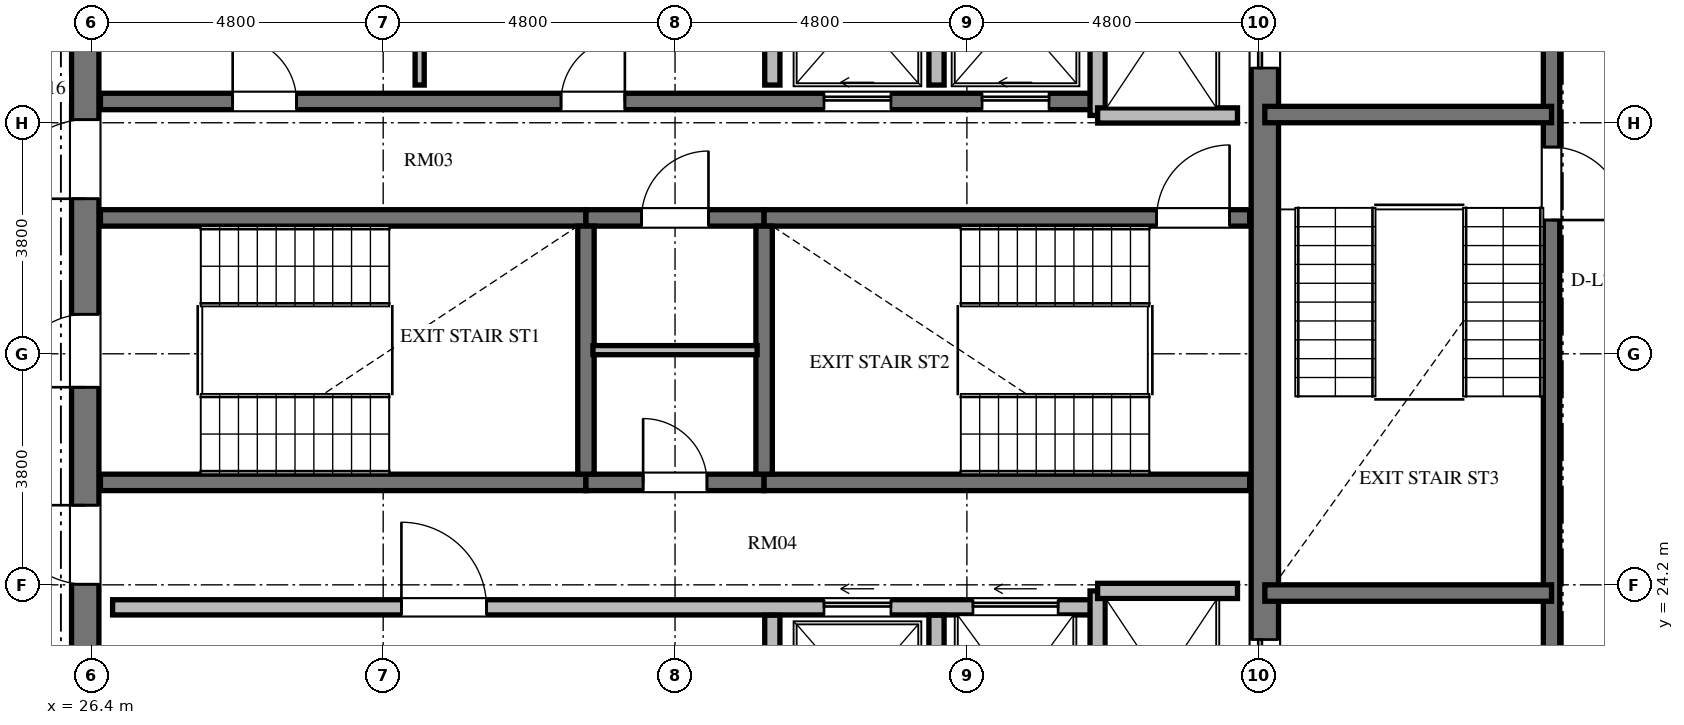
"""IFC4 building model, lengths in metres.
Left out: names, types, materials, properties, quantities, classifications, styles, units other than length and angle.
Written with IfcOpenShell. Run it as: python <this file> out.ifc"""

import sys

from ifc_helpers import new_model, si_unit, direction, frame, frame_2d, origin, place, context, subcontext, project, spatial, rectangle, extrude, element, fill, save


model = new_model("IFC4")
c1 = context("Model", 3, precision=1e-05, world=origin(), true_north=direction((0.0, 1.0)))
c2 = subcontext(c1, "Body", "Model", "MODEL_VIEW")
j1 = project(units=[si_unit("LENGTHUNIT", "METRE"), si_unit("PLANEANGLEUNIT", "RADIAN")], contexts=[c1])
p1 = place(None, origin())
s1 = spatial("IfcSite", under=j1, at=p1, CompositionType="ELEMENT")
p2 = place(p1, origin())
s2 = spatial("IfcBuilding", under=s1, at=p2, CompositionType="ELEMENT")
p3 = place(p2, frame((0.0, 0.0, 295.152)))
s3 = spatial("IfcBuildingStorey", under=s2, at=p3, CompositionType="ELEMENT", Elevation=295.152)
p4 = place(p3, frame((26.3, 20.95, 0.0), z_axis=(0.0, 0.0, 1.0), x_axis=(0.0, 1.0, 0.0)))
e1 = element("IfcWall", 1, at=p4, inside=s3, PredefinedType="SHEAR", context=c2, shape_type="SweptSolid", body=[
    extrude(rectangle(XDim=14.1, YDim=0.45, at=frame_2d((7.05, 0.0))), origin(), (0.0, 0.0, 1.0), 3.648),
])
p5 = place(p4, frame((6.5, 0.0, 0.0)))
e2 = element("IfcOpeningElement", 2, at=p5, cuts=e1, PredefinedType="OPENING", context=c2, shape_type="SweptSolid", body=[
    extrude(rectangle(XDim=1.2, YDim=2.15, at=frame_2d((0.6, 1.075))), frame((0.0, 0.235, 0.0), z_axis=(0.0, -1.0, 0.0), x_axis=(1.0, 0.0, 0.0)), (0.0, 0.0, 1.0), 0.47),
])
p6 = place(p4, frame((9.6, 0.0, 0.0)))
e3 = element("IfcOpeningElement", 3, at=p6, cuts=e1, PredefinedType="OPENING", context=c2, shape_type="SweptSolid", body=[
    extrude(rectangle(XDim=1.3, YDim=2.2, at=frame_2d((0.65, 1.1))), frame((0.0, 0.235, 0.0), z_axis=(0.0, -1.0, 0.0), x_axis=(1.0, 0.0, 0.0)), (0.0, 0.0, 1.0), 0.47),
])
p7 = place(p4, frame((3.26, 0.0, 0.0)))
e4 = element("IfcOpeningElement", 4, at=p7, cuts=e1, PredefinedType="OPENING", context=c2, shape_type="SweptSolid", body=[
    extrude(rectangle(XDim=1.3, YDim=2.2, at=frame_2d((0.65, 1.1))), frame((0.0, 0.235, 0.0), z_axis=(0.0, -1.0, 0.0), x_axis=(1.0, 0.0, 0.0)), (0.0, 0.0, 1.0), 0.47),
])
p8 = place(p3, frame((45.7, 20.95, 0.0), z_axis=(0.0, 0.0, 1.0), x_axis=(0.0, 1.0, 0.0)))
e5 = element("IfcWall", 5, at=p8, inside=s3, PredefinedType="SHEAR", context=c2, shape_type="SweptSolid", body=[
    extrude(rectangle(XDim=14.1, YDim=0.45, at=frame_2d((7.05, 0.0))), origin(), (0.0, 0.0, 1.0), 3.648),
])
p9 = place(p8, frame((11.75, 0.0, 0.0)))
e6 = element("IfcOpeningElement", 6, at=p9, cuts=e5, PredefinedType="OPENING", context=c2, shape_type="SweptSolid", body=[
    extrude(rectangle(XDim=1.4, YDim=2.3, at=frame_2d((0.7, 1.15))), frame((0.0, 0.235, 0.0), z_axis=(0.0, -1.0, 0.0), x_axis=(1.0, 0.0, 0.0)), (0.0, 0.0, 1.0), 0.47),
])
p10 = place(p8, frame((0.95, 0.0, 0.0)))
e7 = element("IfcOpeningElement", 7, at=p10, cuts=e5, PredefinedType="OPENING", context=c2, shape_type="SweptSolid", body=[
    extrude(rectangle(XDim=1.4, YDim=2.3, at=frame_2d((0.7, 1.15))), frame((0.0, 0.235, 0.0), z_axis=(0.0, -1.0, 0.0), x_axis=(1.0, 0.0, 0.0)), (0.0, 0.0, 1.0), 0.47),
])
p11 = place(p3, frame((26.55, 30.235, 0.0), z_axis=(0.0, 0.0, 1.0), x_axis=(1.0, 0.0, 0.0)))
e8 = element("IfcWall", 8, at=p11, inside=s3, PredefinedType="SHEAR", context=c2, shape_type="SweptSolid", body=[
    extrude(rectangle(XDim=7.985, YDim=0.27, at=frame_2d((3.992, 0.0))), origin(), (0.0, 0.0, 1.0), 3.648),
])
p12 = place(p3, frame((34.535, 30.235, 0.0), z_axis=(0.0, 0.0, 1.0), x_axis=(1.0, 0.0, 0.0)))
e9 = element("IfcWall", 9, at=p12, inside=s3, PredefinedType="SHEAR", context=c2, shape_type="SweptSolid", body=[
    extrude(rectangle(XDim=2.93, YDim=0.27, at=frame_2d((1.465, 0.0))), origin(), (0.0, 0.0, 1.0), 3.648),
])
p13 = place(p12, frame((0.915, 0.0, 0.0)))
e10 = element("IfcOpeningElement", 10, at=p13, cuts=e9, PredefinedType="OPENING", context=c2, shape_type="SweptSolid", body=[
    extrude(rectangle(XDim=1.1, YDim=2.15, at=frame_2d((0.55, 1.075))), frame((0.0, 0.145, 0.0), z_axis=(0.0, -1.0, 0.0), x_axis=(1.0, 0.0, 0.0)), (0.0, 0.0, 1.0), 0.29),
])
p14 = place(p3, frame((37.465, 30.235, 0.0), z_axis=(0.0, 0.0, 1.0), x_axis=(1.0, 0.0, 0.0)))
e11 = element("IfcWall", 11, at=p14, inside=s3, PredefinedType="SHEAR", context=c2, shape_type="SweptSolid", body=[
    extrude(rectangle(XDim=7.985, YDim=0.27, at=frame_2d((3.992, 0.0))), origin(), (0.0, 0.0, 1.0), 3.648),
])
p15 = place(p14, frame((6.455, 0.0, 0.0)))
e12 = element("IfcOpeningElement", 12, at=p15, cuts=e11, PredefinedType="OPENING", context=c2, shape_type="SweptSolid", body=[
    extrude(rectangle(XDim=1.2, YDim=2.15, at=frame_2d((0.6, 1.075))), frame((0.0, 0.145, 0.0), z_axis=(0.0, -1.0, 0.0), x_axis=(1.0, 0.0, 0.0)), (0.0, 0.0, 1.0), 0.29),
])
p16 = place(p3, frame((26.55, 25.885, 0.0), z_axis=(0.0, 0.0, 1.0), x_axis=(1.0, 0.0, 0.0)))
e13 = element("IfcWall", 13, at=p16, inside=s3, PredefinedType="SHEAR", context=c2, shape_type="SweptSolid", body=[
    extrude(rectangle(XDim=7.985, YDim=0.27, at=frame_2d((3.992, 0.0))), origin(), (0.0, 0.0, 1.0), 3.648),
])
p17 = place(p3, frame((34.535, 25.885, 0.0), z_axis=(0.0, 0.0, 1.0), x_axis=(1.0, 0.0, 0.0)))
e14 = element("IfcWall", 14, at=p17, inside=s3, PredefinedType="SHEAR", context=c2, shape_type="SweptSolid", body=[
    extrude(rectangle(XDim=2.93, YDim=0.27, at=frame_2d((1.465, 0.0))), origin(), (0.0, 0.0, 1.0), 3.648),
])
p18 = place(p17, frame((0.94, 0.0, 0.0)))
e15 = element("IfcOpeningElement", 15, at=p18, cuts=e14, PredefinedType="OPENING", context=c2, shape_type="SweptSolid", body=[
    extrude(rectangle(XDim=1.05, YDim=2.15, at=frame_2d((0.525, 1.075))), frame((0.0, 0.145, 0.0), z_axis=(0.0, -1.0, 0.0), x_axis=(1.0, 0.0, 0.0)), (0.0, 0.0, 1.0), 0.29),
])
p19 = place(p3, frame((37.465, 25.885, 0.0), z_axis=(0.0, 0.0, 1.0), x_axis=(1.0, 0.0, 0.0)))
e16 = element("IfcWall", 16, at=p19, inside=s3, PredefinedType="SHEAR", context=c2, shape_type="SweptSolid", body=[
    extrude(rectangle(XDim=7.985, YDim=0.27, at=frame_2d((3.992, 0.0))), origin(), (0.0, 0.0, 1.0), 3.648),
])
for number, where, z_axis, x_axis in (
    (17, (34.535, 26.02, 0.0), (0.0, 0.0, 1.0), (0.0, 1.0, 0.0)),
    (18, (37.465, 26.02, 0.0), (0.0, 0.0, 1.0), (0.0, 1.0, 0.0)),
):
    element("IfcWall", number, at=place(p3, frame(where, z_axis=z_axis, x_axis=x_axis)), inside=s3, PredefinedType="SHEAR", context=c2, shape_type="SweptSolid", body=[
        extrude(rectangle(XDim=4.08, YDim=0.27, at=frame_2d((2.04, 0.0))), origin(), (0.0, 0.0, 1.0), 3.648),
    ])
p20 = place(p3, frame((34.65, 28.06, 0.0), z_axis=(0.0, 0.0, 1.0), x_axis=(1.0, 0.0, 0.0)))
e19 = element("IfcWall", 19, at=p20, inside=s3, PredefinedType="PARTITIONING", context=c2, shape_type="SweptSolid", body=[
    extrude(rectangle(XDim=2.7, YDim=0.15, at=frame_2d((1.35, 0.0))), origin(), (0.0, 0.0, 1.0), 3.448),
])
p21 = place(p3, frame((26.55, 32.15, 0.0), z_axis=(0.0, 0.0, 1.0), x_axis=(1.0, 0.0, 0.0)))
e20 = element("IfcWall", 20, at=p21, inside=s3, PredefinedType="SHEAR", context=c2, shape_type="SweptSolid", body=[
    extrude(rectangle(XDim=16.4, YDim=0.27, at=frame_2d((8.2, 0.0))), origin(), (0.0, 0.0, 1.0), 3.648),
])
p22 = place(p21, frame((2.175, 0.0, 0.0)))
e21 = element("IfcOpeningElement", 21, at=p22, cuts=e20, PredefinedType="OPENING", context=c2, shape_type="SweptSolid", body=[
    extrude(rectangle(XDim=1.05, YDim=2.15, at=frame_2d((0.525, 1.075))), frame((0.0, 0.145, 0.0), z_axis=(0.0, -1.0, 0.0), x_axis=(1.0, 0.0, 0.0)), (0.0, 0.0, 1.0), 0.29),
])
p23 = place(p21, frame((7.575, 0.0, 0.0)))
e22 = element("IfcOpeningElement", 22, at=p23, cuts=e20, PredefinedType="OPENING", context=c2, shape_type="SweptSolid", body=[
    extrude(rectangle(XDim=1.05, YDim=2.15, at=frame_2d((0.525, 1.075))), frame((0.0, 0.145, 0.0), z_axis=(0.0, -1.0, 0.0), x_axis=(1.0, 0.0, 0.0)), (0.0, 0.0, 1.0), 0.29),
])
p24 = place(p21, frame((11.9, 0.0, 0.0)))
e23 = element("IfcOpeningElement", 23, at=p24, cuts=e20, PredefinedType="OPENING", context=c2, shape_type="SweptSolid", body=[
    extrude(rectangle(XDim=1.1, YDim=2.2, at=frame_2d((0.55, 1.1))), frame((0.0, 0.145, 0.0), z_axis=(0.0, -1.0, 0.0), x_axis=(1.0, 0.0, 0.0)), (0.0, 0.0, 1.0), 0.29),
])
p25 = place(p21, frame((14.5, 0.0, 0.0)))
e24 = element("IfcOpeningElement", 24, at=p25, cuts=e20, PredefinedType="OPENING", context=c2, shape_type="SweptSolid", body=[
    extrude(rectangle(XDim=1.1, YDim=2.2, at=frame_2d((0.55, 1.1))), frame((0.0, 0.145, 0.0), z_axis=(0.0, -1.0, 0.0), x_axis=(1.0, 0.0, 0.0)), (0.0, 0.0, 1.0), 0.29),
])
p26 = place(p3, frame((26.75, 23.83, 0.0), z_axis=(0.0, 0.0, 1.0), x_axis=(1.0, 0.0, 0.0)))
e25 = element("IfcWall", 25, at=p26, inside=s3, PredefinedType="SOLIDWALL", context=c2, shape_type="SweptSolid", body=[
    extrude(rectangle(XDim=16.2, YDim=0.25, at=frame_2d((8.1, 0.0))), origin(), (0.0, 0.0, 1.0), 3.448),
])
p27 = place(p26, frame((4.75, 0.0, 0.0)))
e26 = element("IfcOpeningElement", 26, at=p27, cuts=e25, PredefinedType="OPENING", context=c2, shape_type="SweptSolid", body=[
    extrude(rectangle(XDim=1.4, YDim=2.2, at=frame_2d((0.7, 1.1))), frame((0.0, 0.135, 0.0), z_axis=(0.0, -1.0, 0.0), x_axis=(1.0, 0.0, 0.0)), (0.0, 0.0, 1.0), 0.27),
])
p28 = place(p26, frame((11.7, 0.0, 0.0)))
e27 = element("IfcOpeningElement", 27, at=p28, cuts=e25, PredefinedType="OPENING", context=c2, shape_type="SweptSolid", body=[
    extrude(rectangle(XDim=1.1, YDim=2.2, at=frame_2d((0.55, 1.1))), frame((0.0, 0.135, 0.0), z_axis=(0.0, -1.0, 0.0), x_axis=(1.0, 0.0, 0.0)), (0.0, 0.0, 1.0), 0.27),
])
p29 = place(p26, frame((14.15, 0.0, 0.0)))
e28 = element("IfcOpeningElement", 28, at=p29, cuts=e25, PredefinedType="OPENING", context=c2, shape_type="SweptSolid", body=[
    extrude(rectangle(XDim=1.4, YDim=2.3, at=frame_2d((0.7, 1.15))), frame((0.0, 0.135, 0.0), z_axis=(0.0, -1.0, 0.0), x_axis=(1.0, 0.0, 0.0)), (0.0, 0.0, 1.0), 0.27),
])
p30 = place(p3, frame((42.95, 31.92, 0.0), z_axis=(0.0, 0.0, 1.0), x_axis=(0.0, 1.0, 0.0)))
e29 = element("IfcWall", 29, at=p30, inside=s3, PredefinedType="SOLIDWALL", context=c2, shape_type="SweptSolid", body=[
    extrude(rectangle(XDim=3.18, YDim=0.25, at=frame_2d((1.59, 0.0))), origin(), (0.0, 0.0, 1.0), 3.448),
])
p31 = place(p3, frame((42.95, 31.92, 0.0), z_axis=(0.0, 0.0, 1.0), x_axis=(1.0, 0.0, 0.0)))
e30 = element("IfcWall", 30, at=p31, inside=s3, PredefinedType="SOLIDWALL", context=c2, shape_type="SweptSolid", body=[
    extrude(rectangle(XDim=2.3, YDim=0.25, at=frame_2d((1.15, 0.0))), origin(), (0.0, 0.0, 1.0), 3.448),
])
p32 = place(p3, frame((42.95, 20.9, 0.0), z_axis=(0.0, 0.0, 1.0), x_axis=(0.0, 1.0, 0.0)))
e31 = element("IfcWall", 31, at=p32, inside=s3, PredefinedType="SOLIDWALL", context=c2, shape_type="SweptSolid", body=[
    extrude(rectangle(XDim=3.2, YDim=0.25, at=frame_2d((1.6, 0.0))), origin(), (0.0, 0.0, 1.0), 3.448),
])
p33 = place(p3, frame((42.95, 24.1, 0.0), z_axis=(0.0, 0.0, 1.0), x_axis=(1.0, 0.0, 0.0)))
e32 = element("IfcWall", 32, at=p33, inside=s3, PredefinedType="SOLIDWALL", context=c2, shape_type="SweptSolid", body=[
    extrude(rectangle(XDim=2.3, YDim=0.25, at=frame_2d((1.15, 0.0))), origin(), (0.0, 0.0, 1.0), 3.448),
])
p34 = place(p3, frame((37.6, 32.42, 0.0), z_axis=(0.0, 0.0, 1.0), x_axis=(0.0, 1.0, 0.0)))
e33 = element("IfcWall", 33, at=p34, inside=s3, PredefinedType="SOLIDWALL", context=c2, shape_type="SweptSolid", body=[
    extrude(rectangle(XDim=2.68, YDim=0.25, at=frame_2d((1.34, 0.0))), origin(), (0.0, 0.0, 1.0), 3.448),
])
p35 = place(p3, frame((37.6, 20.9, 0.0), z_axis=(0.0, 0.0, 1.0), x_axis=(0.0, 1.0, 0.0)))
e34 = element("IfcWall", 34, at=p35, inside=s3, PredefinedType="SOLIDWALL", context=c2, shape_type="SweptSolid", body=[
    extrude(rectangle(XDim=2.8, YDim=0.25, at=frame_2d((1.4, 0.0))), origin(), (0.0, 0.0, 1.0), 3.448),
])
p36 = place(p3, frame((40.3, 32.42, 0.0), z_axis=(0.0, 0.0, 1.0), x_axis=(0.0, 1.0, 0.0)))
e35 = element("IfcWall", 35, at=p36, inside=s3, PredefinedType="SOLIDWALL", context=c2, shape_type="SweptSolid", body=[
    extrude(rectangle(XDim=2.68, YDim=0.25, at=frame_2d((1.34, 0.0))), origin(), (0.0, 0.0, 1.0), 3.448),
])
p37 = place(p3, frame((40.3, 20.9, 0.0), z_axis=(0.0, 0.0, 1.0), x_axis=(0.0, 1.0, 0.0)))
e36 = element("IfcWall", 36, at=p37, inside=s3, PredefinedType="SOLIDWALL", context=c2, shape_type="SweptSolid", body=[
    extrude(rectangle(XDim=2.8, YDim=0.25, at=frame_2d((1.4, 0.0))), origin(), (0.0, 0.0, 1.0), 3.448),
])
p38 = place(p3, frame((31.8, 32.42, 0.0), z_axis=(0.0, 0.0, 1.0), x_axis=(0.0, 1.0, 0.0)))
e37 = element("IfcWall", 37, at=p38, inside=s3, PredefinedType="PARTITIONING", context=c2, shape_type="SweptSolid", body=[
    extrude(rectangle(XDim=2.68, YDim=0.15, at=frame_2d((1.34, 0.0))), origin(), (0.0, 0.0, 1.0), 3.448),
])
p39 = place(p3, frame((50.415, 35.845, 0.0), z_axis=(0.0, 0.0, 1.0), x_axis=(0.0, -1.0, 0.0)))
e38 = element("IfcWall", 38, at=p39, inside=s3, PredefinedType="SHEAR", context=c2, shape_type="SweptSolid", body=[
    extrude(rectangle(XDim=15.825, YDim=0.27, at=frame_2d((7.913, 0.0))), origin(), (0.0, 0.0, 1.0), 3.648),
])
p40 = place(p39, frame((4.445, 0.0, 0.0)))
e39 = element("IfcOpeningElement", 39, at=p40, cuts=e38, PredefinedType="OPENING", context=c2, shape_type="SweptSolid", body=[
    extrude(rectangle(XDim=1.2, YDim=2.15, at=frame_2d((0.6, 1.075))), frame((0.0, 0.145, 0.0), z_axis=(0.0, -1.0, 0.0), x_axis=(1.0, 0.0, 0.0)), (0.0, 0.0, 1.0), 0.29),
])
p41 = place(p39, frame((1.295, 0.0, 0.0)))
e40 = element("IfcOpeningElement", 40, at=p41, cuts=e38, PredefinedType="OPENING", context=c2, shape_type="SweptSolid", body=[
    extrude(rectangle(XDim=1.3, YDim=2.2, at=frame_2d((0.65, 1.1))), frame((0.0, 0.145, 0.0), z_axis=(0.0, -1.0, 0.0), x_axis=(1.0, 0.0, 0.0)), (0.0, 0.0, 1.0), 0.29),
])
p42 = place(p39, frame((13.095, 0.0, 0.0)))
e41 = element("IfcOpeningElement", 41, at=p42, cuts=e38, PredefinedType="OPENING", context=c2, shape_type="SweptSolid", body=[
    extrude(rectangle(XDim=1.3, YDim=2.2, at=frame_2d((0.65, 1.1))), frame((0.0, 0.145, 0.0), z_axis=(0.0, -1.0, 0.0), x_axis=(1.0, 0.0, 0.0)), (0.0, 0.0, 1.0), 0.29),
])
for number, where, z_axis, x_axis in (
    (42, (45.7, 31.935, 0.0), (0.0, 0.0, 1.0), (1.0, 0.0, 0.0)),
    (43, (45.7, 24.065, 0.0), (0.0, 0.0, 1.0), (1.0, 0.0, 0.0)),
):
    element("IfcWall", number, at=place(p3, frame(where, z_axis=z_axis, x_axis=x_axis)), inside=s3, PredefinedType="SHEAR", context=c2, shape_type="SweptSolid", body=[
        extrude(rectangle(XDim=4.715, YDim=0.27, at=frame_2d((2.357, 0.0))), origin(), (0.0, 0.0, 1.0), 3.648),
    ])
p43 = place(p5, origin())
e44 = element("IfcDoor", 44, at=p43, inside=s3, OperationType="SINGLE_SWING_LEFT", PredefinedType="DOOR", context=c2, shape_type="SweptSolid", body=[
    extrude(rectangle(XDim=1.2, YDim=2.15, at=frame_2d((0.6, 1.075))), frame((0.0, 0.025, 0.0), z_axis=(0.0, -1.0, 0.0), x_axis=(1.0, 0.0, 0.0)), (0.0, 0.0, 1.0), 0.05),
])
fill(e2, e44)
p44 = place(p15, origin())
e45 = element("IfcDoor", 45, at=p44, inside=s3, OperationType="SINGLE_SWING_RIGHT", PredefinedType="DOOR", context=c2, shape_type="SweptSolid", body=[
    extrude(rectangle(XDim=1.2, YDim=2.15, at=frame_2d((0.6, 1.075))), frame((0.0, 0.025, 0.0), z_axis=(0.0, -1.0, 0.0), x_axis=(1.0, 0.0, 0.0)), (0.0, 0.0, 1.0), 0.05),
])
fill(e12, e45)
p45 = place(p18, origin())
e46 = element("IfcDoor", 46, at=p45, inside=s3, OperationType="SINGLE_SWING_LEFT", PredefinedType="DOOR", context=c2, shape_type="SweptSolid", body=[
    extrude(rectangle(XDim=1.05, YDim=2.15, at=frame_2d((0.525, 1.075))), frame((0.0, 0.025, 0.0), z_axis=(0.0, -1.0, 0.0), x_axis=(1.0, 0.0, 0.0)), (0.0, 0.0, 1.0), 0.05),
])
fill(e15, e46)
p46 = place(p13, origin())
e47 = element("IfcDoor", 47, at=p46, inside=s3, OperationType="SINGLE_SWING_RIGHT", PredefinedType="DOOR", context=c2, shape_type="SweptSolid", body=[
    extrude(rectangle(XDim=1.1, YDim=2.15, at=frame_2d((0.55, 1.075))), frame((0.0, 0.025, 0.0), z_axis=(0.0, -1.0, 0.0), x_axis=(1.0, 0.0, 0.0)), (0.0, 0.0, 1.0), 0.05),
])
fill(e10, e47)
p47 = place(p6, origin())
e48 = element("IfcDoor", 48, at=p47, inside=s3, OperationType="SINGLE_SWING_LEFT", PredefinedType="DOOR", context=c2, shape_type="SweptSolid", body=[
    extrude(rectangle(XDim=1.3, YDim=2.2, at=frame_2d((0.65, 1.1))), frame((0.0, 0.025, 0.0), z_axis=(0.0, -1.0, 0.0), x_axis=(1.0, 0.0, 0.0)), (0.0, 0.0, 1.0), 0.05),
])
fill(e3, e48)
p48 = place(p7, origin())
e49 = element("IfcDoor", 49, at=p48, inside=s3, OperationType="SINGLE_SWING_RIGHT", PredefinedType="DOOR", context=c2, shape_type="SweptSolid", body=[
    extrude(rectangle(XDim=1.3, YDim=2.2, at=frame_2d((0.65, 1.1))), frame((0.0, 0.025, 0.0), z_axis=(0.0, -1.0, 0.0), x_axis=(1.0, 0.0, 0.0)), (0.0, 0.0, 1.0), 0.05),
])
fill(e4, e49)
p49 = place(p22, origin())
e50 = element("IfcDoor", 50, at=p49, inside=s3, OperationType="SINGLE_SWING_LEFT", PredefinedType="DOOR", context=c2, shape_type="SweptSolid", body=[
    extrude(rectangle(XDim=1.05, YDim=2.15, at=frame_2d((0.525, 1.075))), frame((0.0, 0.025, 0.0), z_axis=(0.0, -1.0, 0.0), x_axis=(1.0, 0.0, 0.0)), (0.0, 0.0, 1.0), 0.05),
])
fill(e21, e50)
p50 = place(p23, origin())
e51 = element("IfcDoor", 51, at=p50, inside=s3, OperationType="SINGLE_SWING_RIGHT", PredefinedType="DOOR", context=c2, shape_type="SweptSolid", body=[
    extrude(rectangle(XDim=1.05, YDim=2.15, at=frame_2d((0.525, 1.075))), frame((0.0, 0.025, 0.0), z_axis=(0.0, -1.0, 0.0), x_axis=(1.0, 0.0, 0.0)), (0.0, 0.0, 1.0), 0.05),
])
fill(e22, e51)
p51 = place(p27, origin())
e52 = element("IfcDoor", 52, at=p51, inside=s3, OperationType="SINGLE_SWING_LEFT", PredefinedType="DOOR", context=c2, shape_type="SweptSolid", body=[
    extrude(rectangle(XDim=1.4, YDim=2.2, at=frame_2d((0.7, 1.1))), frame((0.0, 0.025, 0.0), z_axis=(0.0, -1.0, 0.0), x_axis=(1.0, 0.0, 0.0)), (0.0, 0.0, 1.0), 0.05),
])
fill(e26, e52)
p52 = place(p24, origin())
e53 = element("IfcDoor", 53, at=p52, inside=s3, OperationType="SLIDING_TO_LEFT", PredefinedType="DOOR", context=c2, shape_type="SweptSolid", body=[
    extrude(rectangle(XDim=1.1, YDim=2.2, at=frame_2d((0.55, 1.1))), frame((0.0, 0.025, 0.0), z_axis=(0.0, -1.0, 0.0), x_axis=(1.0, 0.0, 0.0)), (0.0, 0.0, 1.0), 0.05),
])
fill(e23, e53)
p53 = place(p25, origin())
e54 = element("IfcDoor", 54, at=p53, inside=s3, OperationType="SLIDING_TO_LEFT", PredefinedType="DOOR", context=c2, shape_type="SweptSolid", body=[
    extrude(rectangle(XDim=1.1, YDim=2.2, at=frame_2d((0.55, 1.1))), frame((0.0, 0.025, 0.0), z_axis=(0.0, -1.0, 0.0), x_axis=(1.0, 0.0, 0.0)), (0.0, 0.0, 1.0), 0.05),
])
fill(e24, e54)
p54 = place(p28, origin())
e55 = element("IfcDoor", 55, at=p54, inside=s3, OperationType="SLIDING_TO_LEFT", PredefinedType="DOOR", context=c2, shape_type="SweptSolid", body=[
    extrude(rectangle(XDim=1.1, YDim=2.2, at=frame_2d((0.55, 1.1))), frame((0.0, 0.025, 0.0), z_axis=(0.0, -1.0, 0.0), x_axis=(1.0, 0.0, 0.0)), (0.0, 0.0, 1.0), 0.05),
])
fill(e27, e55)
p55 = place(p9, origin())
e56 = element("IfcDoor", 56, at=p55, inside=s3, OperationType="SLIDING_TO_LEFT", PredefinedType="DOOR", context=c2, shape_type="SweptSolid", body=[
    extrude(rectangle(XDim=1.4, YDim=2.3, at=frame_2d((0.7, 1.15))), frame((0.0, 0.025, 0.0), z_axis=(0.0, -1.0, 0.0), x_axis=(1.0, 0.0, 0.0)), (0.0, 0.0, 1.0), 0.05),
])
fill(e6, e56)
p56 = place(p10, origin())
e57 = element("IfcDoor", 57, at=p56, inside=s3, OperationType="SLIDING_TO_LEFT", PredefinedType="DOOR", context=c2, shape_type="SweptSolid", body=[
    extrude(rectangle(XDim=1.4, YDim=2.3, at=frame_2d((0.7, 1.15))), frame((0.0, 0.025, 0.0), z_axis=(0.0, -1.0, 0.0), x_axis=(1.0, 0.0, 0.0)), (0.0, 0.0, 1.0), 0.05),
])
fill(e7, e57)
p57 = place(p29, origin())
e58 = element("IfcDoor", 58, at=p57, inside=s3, OperationType="SLIDING_TO_LEFT", PredefinedType="DOOR", context=c2, shape_type="SweptSolid", body=[
    extrude(rectangle(XDim=1.4, YDim=2.3, at=frame_2d((0.7, 1.15))), frame((0.0, 0.025, 0.0), z_axis=(0.0, -1.0, 0.0), x_axis=(1.0, 0.0, 0.0)), (0.0, 0.0, 1.0), 0.05),
])
fill(e28, e58)
p58 = place(p40, origin())
e59 = element("IfcDoor", 59, at=p58, inside=s3, OperationType="SINGLE_SWING_RIGHT", PredefinedType="DOOR", context=c2, shape_type="SweptSolid", body=[
    extrude(rectangle(XDim=1.2, YDim=2.15, at=frame_2d((0.6, 1.075))), frame((0.0, 0.025, 0.0), z_axis=(0.0, -1.0, 0.0), x_axis=(1.0, 0.0, 0.0)), (0.0, 0.0, 1.0), 0.05),
])
fill(e39, e59)
save(model, sys.argv[1])
